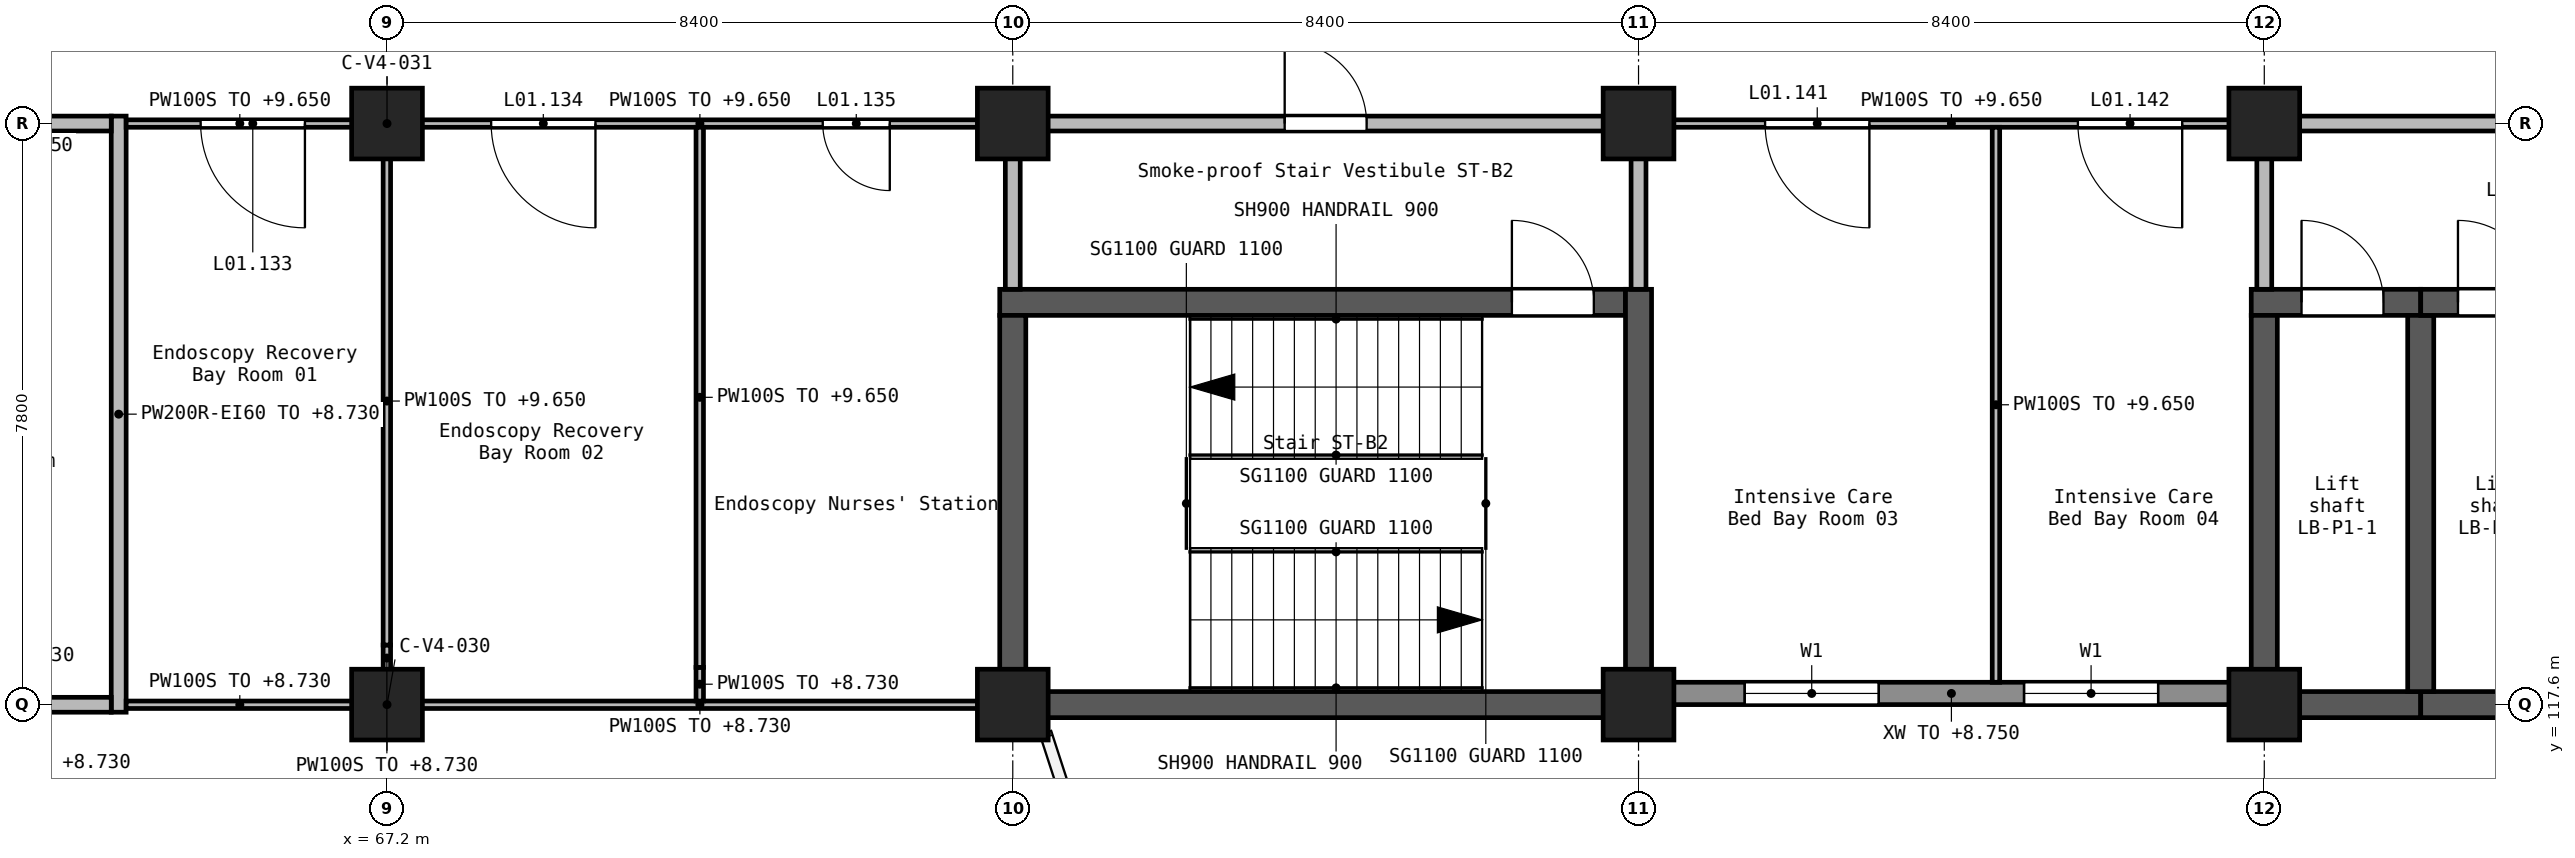
"""IFC4 building model, lengths in metres.
Left out: names, types, materials, properties, quantities, classifications, styles, units other than length and angle.
Written with IfcOpenShell. Run it as: python <this file> out.ifc"""

import sys

from ifc_helpers import new_model, si_unit, direction, frame, frame_2d, origin, origin_2d, place, context, subcontext, project, spatial, rectangle, extrude, element, fill, save


model = new_model("IFC4")
c1 = context("Model", 3, precision=1e-05, world=origin(), true_north=direction((0.0, 1.0)))
c2 = subcontext(c1, "Body", "Model", "MODEL_VIEW")
j1 = project(units=[si_unit("LENGTHUNIT", "METRE"), si_unit("PLANEANGLEUNIT", "RADIAN")], contexts=[c1])
p1 = place(None, origin())
s1 = spatial("IfcSite", under=j1, at=p1, CompositionType="ELEMENT")
p2 = place(p1, origin())
s2 = spatial("IfcBuilding", under=s1, at=p2, CompositionType="ELEMENT")
p3 = place(p2, frame((0.0, 0.0, 5.4)))
s3 = spatial("IfcBuildingStorey", under=s2, at=p3, CompositionType="ELEMENT", Elevation=5.4)
for number, where, z_axis, x_axis in (
    (1, (67.2, 117.6, 0.0), (0.0, 0.0, 1.0), (1.0, 0.0, 0.0)),
    (2, (67.2, 125.4, 0.0), (0.0, 0.0, 1.0), (1.0, 0.0, 0.0)),
    (3, (75.6, 117.6, 0.0), (0.0, 0.0, 1.0), (1.0, 0.0, 0.0)),
    (4, (75.6, 125.4, 0.0), (0.0, 0.0, 1.0), (1.0, 0.0, 0.0)),
    (5, (84.0, 117.6, 0.0), (0.0, 0.0, 1.0), (1.0, 0.0, 0.0)),
    (6, (84.0, 125.4, 0.0), (0.0, 0.0, 1.0), (1.0, 0.0, 0.0)),
    (7, (92.4, 117.6, 0.0), (0.0, 0.0, 1.0), (1.0, 0.0, 0.0)),
    (8, (92.4, 125.4, 0.0), (0.0, 0.0, 1.0), (1.0, 0.0, 0.0)),
):
    element("IfcColumn", number, at=place(p3, frame(where, z_axis=z_axis, x_axis=x_axis)), inside=s3, PredefinedType="COLUMN", context=c2, shape_type="SweptSolid", body=[
        extrude(rectangle(XDim=0.95, YDim=0.95, at=origin_2d()), origin(), (0.0, 0.0, 1.0), 4.5),
    ])
p4 = place(p3, frame((75.425, 123.0, 0.0), z_axis=(0.0, 0.0, 1.0), x_axis=(1.0, 0.0, 0.0)))
e9 = element("IfcWall", 9, at=p4, inside=s3, PredefinedType="SHEAR", context=c2, shape_type="SweptSolid", body=[
    extrude(rectangle(XDim=8.4, YDim=0.35, at=frame_2d((4.2, 0.0))), origin(), (0.0, 0.0, 1.0), 4.5),
])
p5 = place(p4, frame((6.875, 0.0, 0.0)))
e10 = element("IfcOpeningElement", 10, at=p5, cuts=e9, PredefinedType="OPENING", context=c2, shape_type="SweptSolid", body=[
    extrude(rectangle(XDim=1.1, YDim=2.1, at=frame_2d((0.55, 1.05))), frame((0.0, 0.185, 0.0), z_axis=(0.0, -1.0, 0.0), x_axis=(1.0, 0.0, 0.0)), (0.0, 0.0, 1.0), 0.37),
])
p6 = place(p3, frame((75.6, 117.425, 0.0), z_axis=(0.0, 0.0, 1.0), x_axis=(0.0, 1.0, 0.0)))
e11 = element("IfcWall", 11, at=p6, inside=s3, PredefinedType="SHEAR", context=c2, shape_type="SweptSolid", body=[
    extrude(rectangle(XDim=5.4, YDim=0.35, at=frame_2d((2.7, 0.0))), origin(), (0.0, 0.0, 1.0), 4.5),
])
p7 = place(p3, frame((75.775, 117.6, 0.0), z_axis=(0.0, 0.0, 1.0), x_axis=(1.0, 0.0, 0.0)))
e12 = element("IfcWall", 12, at=p7, inside=s3, PredefinedType="SHEAR", context=c2, shape_type="SweptSolid", body=[
    extrude(rectangle(XDim=8.05, YDim=0.35, at=frame_2d((4.025, 0.0))), origin(), (0.0, 0.0, 1.0), 4.5),
])
p8 = place(p3, frame((84.0, 117.425, 0.0), z_axis=(0.0, 0.0, 1.0), x_axis=(0.0, 1.0, 0.0)))
e13 = element("IfcWall", 13, at=p8, inside=s3, PredefinedType="SHEAR", context=c2, shape_type="SweptSolid", body=[
    extrude(rectangle(XDim=5.75, YDim=0.35, at=frame_2d((2.875, 0.0))), origin(), (0.0, 0.0, 1.0), 4.5),
])
p9 = place(p3, frame((92.225, 123.0, 0.0), z_axis=(0.0, 0.0, 1.0), x_axis=(1.0, 0.0, 0.0)))
e14 = element("IfcWall", 14, at=p9, inside=s3, PredefinedType="SHEAR", context=c2, shape_type="SweptSolid", body=[
    extrude(rectangle(XDim=2.275, YDim=0.35, at=frame_2d((1.137, 0.0))), origin(), (0.0, 0.0, 1.0), 4.5),
])
p10 = place(p9, frame((0.675, 0.0, 0.0)))
e15 = element("IfcOpeningElement", 15, at=p10, cuts=e14, PredefinedType="OPENING", context=c2, shape_type="SweptSolid", body=[
    extrude(rectangle(XDim=1.1, YDim=2.1, at=frame_2d((0.55, 1.05))), frame((0.0, 0.185, 0.0), z_axis=(0.0, -1.0, 0.0), x_axis=(1.0, 0.0, 0.0)), (0.0, 0.0, 1.0), 0.37),
])
p11 = place(p3, frame((92.4, 117.425, 0.0), z_axis=(0.0, 0.0, 1.0), x_axis=(0.0, 1.0, 0.0)))
e16 = element("IfcWall", 16, at=p11, inside=s3, PredefinedType="SHEAR", context=c2, shape_type="SweptSolid", body=[
    extrude(rectangle(XDim=5.4, YDim=0.35, at=frame_2d((2.7, 0.0))), origin(), (0.0, 0.0, 1.0), 4.5),
])
p12 = place(p3, frame((92.575, 117.6, 0.0), z_axis=(0.0, 0.0, 1.0), x_axis=(1.0, 0.0, 0.0)))
e17 = element("IfcWall", 17, at=p12, inside=s3, PredefinedType="SHEAR", context=c2, shape_type="SweptSolid", body=[
    extrude(rectangle(XDim=1.925, YDim=0.35, at=frame_2d((0.962, 0.0))), origin(), (0.0, 0.0, 1.0), 4.5),
])
p13 = place(p3, frame((94.5, 117.6, 0.0), z_axis=(0.0, 0.0, 1.0), x_axis=(1.0, 0.0, 0.0)))
e18 = element("IfcWall", 18, at=p13, inside=s3, PredefinedType="SHEAR", context=c2, shape_type="SweptSolid", body=[
    extrude(rectangle(XDim=2.1, YDim=0.35, at=frame_2d((1.05, 0.0))), origin(), (0.0, 0.0, 1.0), 4.5),
])
p14 = place(p3, frame((94.5, 117.775, 0.0), z_axis=(0.0, 0.0, 1.0), x_axis=(0.0, 1.0, 0.0)))
e19 = element("IfcWall", 19, at=p14, inside=s3, PredefinedType="SHEAR", context=c2, shape_type="SweptSolid", body=[
    extrude(rectangle(XDim=5.05, YDim=0.35, at=frame_2d((2.525, 0.0))), origin(), (0.0, 0.0, 1.0), 4.5),
])
p15 = place(p3, frame((94.5, 123.0, 0.0), z_axis=(0.0, 0.0, 1.0), x_axis=(1.0, 0.0, 0.0)))
e20 = element("IfcWall", 20, at=p15, inside=s3, PredefinedType="SHEAR", context=c2, shape_type="SweptSolid", body=[
    extrude(rectangle(XDim=2.1, YDim=0.35, at=frame_2d((1.05, 0.0))), origin(), (0.0, 0.0, 1.0), 4.5),
])
p16 = place(p15, frame((0.5, 0.0, 0.0)))
e21 = element("IfcOpeningElement", 21, at=p16, cuts=e20, PredefinedType="OPENING", context=c2, shape_type="SweptSolid", body=[
    extrude(rectangle(XDim=1.1, YDim=2.1, at=frame_2d((0.55, 1.05))), frame((0.0, 0.185, 0.0), z_axis=(0.0, -1.0, 0.0), x_axis=(1.0, 0.0, 0.0)), (0.0, 0.0, 1.0), 0.37),
])
p17 = place(p3, frame((84.45, 117.75, 0.0), z_axis=(0.0, 0.0, 1.0), x_axis=(1.0, 0.0, 0.0)))
e22 = element("IfcWall", 22, at=p17, inside=s3, PredefinedType="STANDARD", context=c2, shape_type="SweptSolid", body=[
    extrude(rectangle(XDim=7.5, YDim=0.3, at=frame_2d((3.75, 0.0))), origin(), (0.0, 0.0, 1.0), 3.35),
])
p18 = place(p17, frame((0.975, 0.0, 0.9)))
e23 = element("IfcOpeningElement", 23, at=p18, cuts=e22, PredefinedType="OPENING", context=c2, shape_type="SweptSolid", body=[
    extrude(rectangle(XDim=1.8, YDim=1.5, at=frame_2d((0.9, 0.75))), frame((0.0, 0.16, 0.0), z_axis=(0.0, -1.0, 0.0), x_axis=(1.0, 0.0, 0.0)), (0.0, 0.0, 1.0), 0.32),
])
p19 = place(p17, frame((4.725, 0.0, 0.9)))
e24 = element("IfcOpeningElement", 24, at=p19, cuts=e22, PredefinedType="OPENING", context=c2, shape_type="SweptSolid", body=[
    extrude(rectangle(XDim=1.8, YDim=1.5, at=frame_2d((0.9, 0.75))), frame((0.0, 0.16, 0.0), z_axis=(0.0, -1.0, 0.0), x_axis=(1.0, 0.0, 0.0)), (0.0, 0.0, 1.0), 0.32),
])
p20 = place(p3, frame((76.05, 125.4, 0.0), z_axis=(0.0, 0.0, 1.0), x_axis=(1.0, 0.0, 0.0)))
e25 = element("IfcWall", 25, at=p20, inside=s3, PredefinedType="SOLIDWALL", context=c2, shape_type="SweptSolid", body=[
    extrude(rectangle(XDim=7.5, YDim=0.2, at=frame_2d((3.75, 0.0))), origin(), (0.0, 0.0, 1.0), 4.25),
])
p21 = place(p20, frame((3.2, 0.0, 0.0)))
e26 = element("IfcOpeningElement", 26, at=p21, cuts=e25, PredefinedType="OPENING", context=c2, shape_type="SweptSolid", body=[
    extrude(rectangle(XDim=1.1, YDim=2.1, at=frame_2d((0.55, 1.05))), frame((0.0, 0.11, 0.0), z_axis=(0.0, -1.0, 0.0), x_axis=(1.0, 0.0, 0.0)), (0.0, 0.0, 1.0), 0.22),
])
p22 = place(p3, frame((92.85, 125.4, 0.0), z_axis=(0.0, 0.0, 1.0), x_axis=(1.0, 0.0, 0.0)))
e27 = element("IfcWall", 27, at=p22, inside=s3, PredefinedType="SOLIDWALL", context=c2, shape_type="SweptSolid", body=[
    extrude(rectangle(XDim=7.5, YDim=0.2, at=frame_2d((3.75, 0.0))), origin(), (0.0, 0.0, 1.0), 4.25),
])
p23 = place(p22, frame((2.85, 0.0, 0.0)))
e28 = element("IfcOpeningElement", 28, at=p23, cuts=e27, PredefinedType="OPENING", context=c2, shape_type="SweptSolid", body=[
    extrude(rectangle(XDim=1.8, YDim=2.1, at=frame_2d((0.9, 1.05))), frame((0.0, 0.11, 0.0), z_axis=(0.0, -1.0, 0.0), x_axis=(1.0, 0.0, 0.0)), (0.0, 0.0, 1.0), 0.22),
])
p24 = place(p3, frame((63.598, 117.498, 0.0), z_axis=(0.0, 0.0, 1.0), x_axis=(0.0, 1.0, 0.0)))
e29 = element("IfcWall", 29, at=p24, inside=s3, PredefinedType="SOLIDWALL", context=c2, shape_type="SweptSolid", body=[
    extrude(rectangle(XDim=8.002, YDim=0.2, at=frame_2d((4.001, 0.0))), origin(), (0.0, 0.0, 1.0), 3.33),
])
p25 = place(p3, frame((59.25, 117.598, 0.0), z_axis=(0.0, 0.0, 1.0), x_axis=(1.0, 0.0, 0.0)))
e30 = element("IfcWall", 30, at=p25, inside=s3, PredefinedType="SOLIDWALL", context=c2, shape_type="SweptSolid", body=[
    extrude(rectangle(XDim=4.248, YDim=0.2, at=frame_2d((2.124, 0.0))), origin(), (0.0, 0.0, 1.0), 3.33),
])
p26 = place(p3, frame((59.25, 125.4, 0.0), z_axis=(0.0, 0.0, 1.0), x_axis=(1.0, 0.0, 0.0)))
e31 = element("IfcWall", 31, at=p26, inside=s3, PredefinedType="SOLIDWALL", context=c2, shape_type="SweptSolid", body=[
    extrude(rectangle(XDim=4.248, YDim=0.2, at=frame_2d((2.124, 0.0))), origin(), (0.0, 0.0, 1.0), 4.25),
])
p27 = place(p26, frame((1.448, 0.0, 0.0)))
e32 = element("IfcOpeningElement", 32, at=p27, cuts=e31, PredefinedType="OPENING", context=c2, shape_type="SweptSolid", body=[
    extrude(rectangle(XDim=1.0, YDim=2.1, at=frame_2d((0.5, 1.05))), frame((0.0, 0.11, 0.0), z_axis=(0.0, -1.0, 0.0), x_axis=(1.0, 0.0, 0.0)), (0.0, 0.0, 1.0), 0.22),
])
for number, where, z_axis, x_axis in (
    (33, (75.6, 123.175, 0.0), (0.0, 0.0, 1.0), (0.0, 1.0, 0.0)),
    (34, (84.0, 123.175, 0.0), (0.0, 0.0, 1.0), (0.0, 1.0, 0.0)),
    (35, (92.4, 123.175, 0.0), (0.0, 0.0, 1.0), (0.0, 1.0, 0.0)),
):
    element("IfcWall", number, at=place(p3, frame(where, z_axis=z_axis, x_axis=x_axis)), inside=s3, PredefinedType="SOLIDWALL", context=c2, shape_type="SweptSolid", body=[
        extrude(rectangle(XDim=1.775, YDim=0.2, at=frame_2d((0.887, 0.0))), origin(), (0.0, 0.0, 1.0), 4.25),
    ])
p28 = place(p3, frame((75.15, 117.598, 0.0), z_axis=(0.0, 0.0, 1.0), x_axis=(-1.0, 0.0, 0.0)))
e36 = element("IfcWall", 36, at=p28, inside=s3, PredefinedType="PARTITIONING", context=c2, shape_type="SweptSolid", body=[
    extrude(rectangle(XDim=7.5, YDim=0.1, at=frame_2d((3.75, 0.0))), origin(), (0.0, 0.0, 1.0), 3.33),
])
p29 = place(p3, frame((66.75, 117.598, 0.0), z_axis=(0.0, 0.0, 1.0), x_axis=(-1.0, 0.0, 0.0)))
e37 = element("IfcWall", 37, at=p29, inside=s3, PredefinedType="PARTITIONING", context=c2, shape_type="SweptSolid", body=[
    extrude(rectangle(XDim=3.052, YDim=0.1, at=frame_2d((1.526, 0.0))), origin(), (0.0, 0.0, 1.0), 3.33),
])
p30 = place(p3, frame((75.15, 125.4, 0.0), z_axis=(0.0, 0.0, 1.0), x_axis=(-1.0, 0.0, 0.0)))
e38 = element("IfcWall", 38, at=p30, inside=s3, PredefinedType="PARTITIONING", context=c2, shape_type="SweptSolid", body=[
    extrude(rectangle(XDim=7.5, YDim=0.1, at=frame_2d((3.75, 0.0))), origin(), (0.0, 0.0, 1.0), 4.25),
])
p31 = place(p30, frame((5.152, 0.0, 0.0)))
e39 = element("IfcOpeningElement", 39, at=p31, cuts=e38, PredefinedType="OPENING", context=c2, shape_type="SweptSolid", body=[
    extrude(rectangle(XDim=1.4, YDim=2.1, at=frame_2d((0.7, 1.05))), frame((0.0, 0.06, 0.0), z_axis=(0.0, -1.0, 0.0), x_axis=(1.0, 0.0, 0.0)), (0.0, 0.0, 1.0), 0.12),
])
p32 = place(p30, frame((1.201, 0.0, 0.0)))
e40 = element("IfcOpeningElement", 40, at=p32, cuts=e38, PredefinedType="OPENING", context=c2, shape_type="SweptSolid", body=[
    extrude(rectangle(XDim=0.9, YDim=2.1, at=frame_2d((0.45, 1.05))), frame((0.0, 0.06, 0.0), z_axis=(0.0, -1.0, 0.0), x_axis=(1.0, 0.0, 0.0)), (0.0, 0.0, 1.0), 0.12),
])
p33 = place(p3, frame((66.75, 125.4, 0.0), z_axis=(0.0, 0.0, 1.0), x_axis=(-1.0, 0.0, 0.0)))
e41 = element("IfcWall", 41, at=p33, inside=s3, PredefinedType="PARTITIONING", context=c2, shape_type="SweptSolid", body=[
    extrude(rectangle(XDim=3.052, YDim=0.1, at=frame_2d((1.526, 0.0))), origin(), (0.0, 0.0, 1.0), 4.25),
])
p34 = place(p33, frame((0.652, 0.0, 0.0)))
e42 = element("IfcOpeningElement", 42, at=p34, cuts=e41, PredefinedType="OPENING", context=c2, shape_type="SweptSolid", body=[
    extrude(rectangle(XDim=1.4, YDim=2.1, at=frame_2d((0.7, 1.05))), frame((0.0, 0.06, 0.0), z_axis=(0.0, -1.0, 0.0), x_axis=(1.0, 0.0, 0.0)), (0.0, 0.0, 1.0), 0.12),
])
p35 = place(p3, frame((91.95, 125.4, 0.0), z_axis=(0.0, 0.0, 1.0), x_axis=(-1.0, 0.0, 0.0)))
e43 = element("IfcWall", 43, at=p35, inside=s3, PredefinedType="PARTITIONING", context=c2, shape_type="SweptSolid", body=[
    extrude(rectangle(XDim=7.5, YDim=0.1, at=frame_2d((3.75, 0.0))), origin(), (0.0, 0.0, 1.0), 4.25),
])
p36 = place(p35, frame((4.851, 0.0, 0.0)))
e44 = element("IfcOpeningElement", 44, at=p36, cuts=e43, PredefinedType="OPENING", context=c2, shape_type="SweptSolid", body=[
    extrude(rectangle(XDim=1.4, YDim=2.1, at=frame_2d((0.7, 1.05))), frame((0.0, 0.06, 0.0), z_axis=(0.0, -1.0, 0.0), x_axis=(1.0, 0.0, 0.0)), (0.0, 0.0, 1.0), 0.12),
])
p37 = place(p35, frame((0.652, 0.0, 0.0)))
e45 = element("IfcOpeningElement", 45, at=p37, cuts=e43, PredefinedType="OPENING", context=c2, shape_type="SweptSolid", body=[
    extrude(rectangle(XDim=1.4, YDim=2.1, at=frame_2d((0.7, 1.05))), frame((0.0, 0.06, 0.0), z_axis=(0.0, -1.0, 0.0), x_axis=(1.0, 0.0, 0.0)), (0.0, 0.0, 1.0), 0.12),
])
p38 = place(p3, frame((67.198, 118.05, 0.0), z_axis=(0.0, 0.0, 1.0), x_axis=(0.0, 1.0, 0.0)))
e46 = element("IfcWall", 46, at=p38, inside=s3, PredefinedType="PARTITIONING", context=c2, shape_type="SweptSolid", body=[
    extrude(rectangle(XDim=0.35, YDim=0.1, at=frame_2d((0.175, 0.0))), origin(), (0.0, 0.0, 1.0), 3.33),
])
p39 = place(p3, frame((67.198, 118.4, 0.0), z_axis=(0.0, 0.0, 1.0), x_axis=(0.0, 1.0, 0.0)))
e47 = element("IfcWall", 47, at=p39, inside=s3, PredefinedType="PARTITIONING", context=c2, shape_type="SweptSolid", body=[
    extrude(rectangle(XDim=6.55, YDim=0.1, at=frame_2d((3.275, 0.0))), origin(), (0.0, 0.0, 1.0), 4.25),
])
p40 = place(p3, frame((71.398, 117.648, 0.0), z_axis=(0.0, 0.0, 1.0), x_axis=(0.0, 1.0, 0.0)))
e48 = element("IfcWall", 48, at=p40, inside=s3, PredefinedType="PARTITIONING", context=c2, shape_type="SweptSolid", body=[
    extrude(rectangle(XDim=0.452, YDim=0.1, at=frame_2d((0.226, 0.0))), origin(), (0.0, 0.0, 1.0), 3.33),
])
p41 = place(p3, frame((71.398, 118.1, 0.0), z_axis=(0.0, 0.0, 1.0), x_axis=(0.0, 1.0, 0.0)))
e49 = element("IfcWall", 49, at=p41, inside=s3, PredefinedType="PARTITIONING", context=c2, shape_type="SweptSolid", body=[
    extrude(rectangle(XDim=7.25, YDim=0.1, at=frame_2d((3.625, 0.0))), origin(), (0.0, 0.0, 1.0), 4.25),
])
p42 = place(p3, frame((88.798, 117.9, 0.0), z_axis=(0.0, 0.0, 1.0), x_axis=(0.0, 1.0, 0.0)))
e50 = element("IfcWall", 50, at=p42, inside=s3, PredefinedType="PARTITIONING", context=c2, shape_type="SweptSolid", body=[
    extrude(rectangle(XDim=7.45, YDim=0.1, at=frame_2d((3.725, 0.0))), origin(), (0.0, 0.0, 1.0), 4.25),
])
p43 = place(p18, origin())
e51 = element("IfcWindow", 51, at=p43, inside=s3, PartitioningType="SINGLE_PANEL", PredefinedType="WINDOW", context=c2, shape_type="SweptSolid", body=[
    extrude(rectangle(XDim=1.8, YDim=1.5, at=frame_2d((0.9, 0.75))), frame((0.0, 0.03, 0.0), z_axis=(0.0, -1.0, 0.0), x_axis=(1.0, 0.0, 0.0)), (0.0, 0.0, 1.0), 0.06),
])
fill(e23, e51)
p44 = place(p19, origin())
e52 = element("IfcWindow", 52, at=p44, inside=s3, PartitioningType="SINGLE_PANEL", PredefinedType="WINDOW", context=c2, shape_type="SweptSolid", body=[
    extrude(rectangle(XDim=1.8, YDim=1.5, at=frame_2d((0.9, 0.75))), frame((0.0, 0.03, 0.0), z_axis=(0.0, -1.0, 0.0), x_axis=(1.0, 0.0, 0.0)), (0.0, 0.0, 1.0), 0.06),
])
fill(e24, e52)
p45 = place(p10, origin())
e53 = element("IfcDoor", 53, at=p45, inside=s3, OperationType="DOUBLE_DOOR_SLIDING", PredefinedType="DOOR", context=c2, shape_type="SweptSolid", body=[
    extrude(rectangle(XDim=1.1, YDim=2.1, at=frame_2d((0.55, 1.05))), frame((0.0, 0.025, 0.0), z_axis=(0.0, -1.0, 0.0), x_axis=(1.0, 0.0, 0.0)), (0.0, 0.0, 1.0), 0.05),
])
fill(e15, e53)
p46 = place(p16, origin())
e54 = element("IfcDoor", 54, at=p46, inside=s3, OperationType="DOUBLE_DOOR_SLIDING", PredefinedType="DOOR", context=c2, shape_type="SweptSolid", body=[
    extrude(rectangle(XDim=1.1, YDim=2.1, at=frame_2d((0.55, 1.05))), frame((0.0, 0.025, 0.0), z_axis=(0.0, -1.0, 0.0), x_axis=(1.0, 0.0, 0.0)), (0.0, 0.0, 1.0), 0.05),
])
fill(e21, e54)
p47 = place(p5, frame((1.1, 0.0, 0.0), z_axis=(0.0, 0.0, 1.0), x_axis=(-1.0, 0.0, 0.0)))
e55 = element("IfcDoor", 55, at=p47, inside=s3, OperationType="SINGLE_SWING_LEFT", PredefinedType="DOOR", context=c2, shape_type="SweptSolid", body=[
    extrude(rectangle(XDim=1.1, YDim=2.1, at=frame_2d((0.55, 1.05))), frame((0.0, 0.025, 0.0), z_axis=(0.0, -1.0, 0.0), x_axis=(1.0, 0.0, 0.0)), (0.0, 0.0, 1.0), 0.05),
])
fill(e10, e55)
p48 = place(p21, frame((1.1, 0.0, 0.0), z_axis=(0.0, 0.0, 1.0), x_axis=(-1.0, 0.0, 0.0)))
e56 = element("IfcDoor", 56, at=p48, inside=s3, OperationType="SINGLE_SWING_LEFT", PredefinedType="DOOR", context=c2, shape_type="SweptSolid", body=[
    extrude(rectangle(XDim=1.1, YDim=2.1, at=frame_2d((0.55, 1.05))), frame((0.0, 0.025, 0.0), z_axis=(0.0, -1.0, 0.0), x_axis=(1.0, 0.0, 0.0)), (0.0, 0.0, 1.0), 0.05),
])
fill(e26, e56)
p49 = place(p34, origin())
e57 = element("IfcDoor", 57, at=p49, inside=s3, OperationType="DOUBLE_DOOR_SINGLE_SWING", PredefinedType="DOOR", context=c2, shape_type="SweptSolid", body=[
    extrude(rectangle(XDim=1.4, YDim=2.1, at=frame_2d((0.7, 1.05))), frame((0.0, 0.025, 0.0), z_axis=(0.0, -1.0, 0.0), x_axis=(1.0, 0.0, 0.0)), (0.0, 0.0, 1.0), 0.05),
])
fill(e42, e57)
p50 = place(p31, origin())
e58 = element("IfcDoor", 58, at=p50, inside=s3, OperationType="DOUBLE_DOOR_SINGLE_SWING", PredefinedType="DOOR", context=c2, shape_type="SweptSolid", body=[
    extrude(rectangle(XDim=1.4, YDim=2.1, at=frame_2d((0.7, 1.05))), frame((0.0, 0.025, 0.0), z_axis=(0.0, -1.0, 0.0), x_axis=(1.0, 0.0, 0.0)), (0.0, 0.0, 1.0), 0.05),
])
fill(e39, e58)
p51 = place(p32, origin())
e59 = element("IfcDoor", 59, at=p51, inside=s3, OperationType="SINGLE_SWING_LEFT", PredefinedType="DOOR", context=c2, shape_type="SweptSolid", body=[
    extrude(rectangle(XDim=0.9, YDim=2.1, at=frame_2d((0.45, 1.05))), frame((0.0, 0.025, 0.0), z_axis=(0.0, -1.0, 0.0), x_axis=(1.0, 0.0, 0.0)), (0.0, 0.0, 1.0), 0.05),
])
fill(e40, e59)
p52 = place(p36, origin())
e60 = element("IfcDoor", 60, at=p52, inside=s3, OperationType="DOUBLE_DOOR_SINGLE_SWING", PredefinedType="DOOR", context=c2, shape_type="SweptSolid", body=[
    extrude(rectangle(XDim=1.4, YDim=2.1, at=frame_2d((0.7, 1.05))), frame((0.0, 0.025, 0.0), z_axis=(0.0, -1.0, 0.0), x_axis=(1.0, 0.0, 0.0)), (0.0, 0.0, 1.0), 0.05),
])
fill(e44, e60)
p53 = place(p37, origin())
e61 = element("IfcDoor", 61, at=p53, inside=s3, OperationType="DOUBLE_DOOR_SINGLE_SWING", PredefinedType="DOOR", context=c2, shape_type="SweptSolid", body=[
    extrude(rectangle(XDim=1.4, YDim=2.1, at=frame_2d((0.7, 1.05))), frame((0.0, 0.025, 0.0), z_axis=(0.0, -1.0, 0.0), x_axis=(1.0, 0.0, 0.0)), (0.0, 0.0, 1.0), 0.05),
])
fill(e45, e61)
save(model, sys.argv[1])
